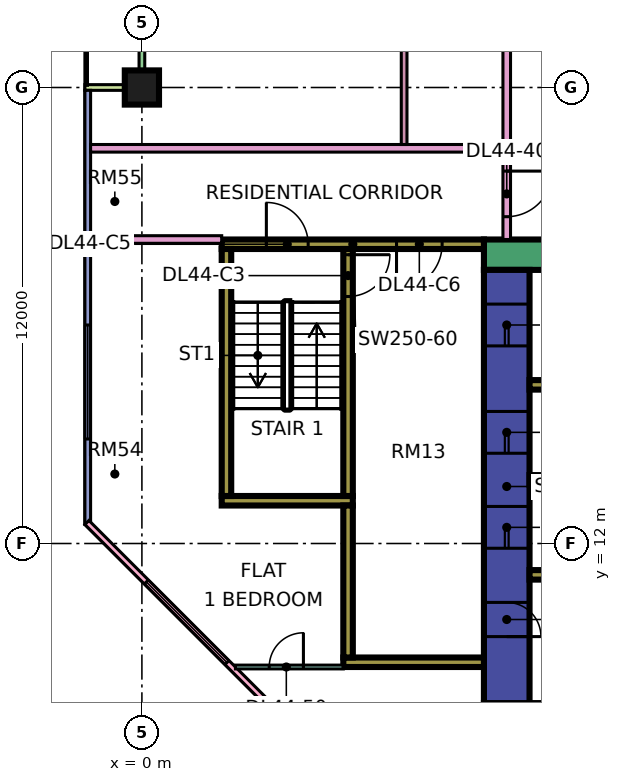
"""IFC4 building model, lengths in metres.
Left out: names, types, materials, properties, quantities, classifications, styles, units other than length and angle.
Written with IfcOpenShell. Run it as: python <this file> out.ifc"""

import sys

from ifc_helpers import new_model, si_unit, direction, frame, frame_2d, origin, origin_2d, place, context, subcontext, project, spatial, rectangle, extrude, element, fill, save


model = new_model("IFC4")
c1 = context("Model", 3, precision=1e-05, world=origin(), true_north=direction((0.0, 1.0)))
c2 = subcontext(c1, "Body", "Model", "MODEL_VIEW")
j1 = project(units=[si_unit("LENGTHUNIT", "METRE"), si_unit("PLANEANGLEUNIT", "RADIAN")], contexts=[c1])
p1 = place(None, origin())
s1 = spatial("IfcSite", under=j1, at=p1, CompositionType="ELEMENT")
p2 = place(p1, origin())
s2 = spatial("IfcBuilding", under=s1, at=p2, CompositionType="ELEMENT")
p3 = place(p2, frame((0.0, 0.0, 191.15)))
s3 = spatial("IfcBuildingStorey", under=s2, at=p3, CompositionType="ELEMENT", Elevation=191.15)
p4 = place(p3, frame((0.0, 24.0, 0.0), z_axis=(0.0, 0.0, 1.0), x_axis=(1.0, 0.0, 0.0)))
e1 = element("IfcColumn", 1, at=p4, inside=s3, PredefinedType="COLUMN", context=c2, shape_type="SweptSolid", body=[
    extrude(rectangle(XDim=0.9, YDim=0.9, at=origin_2d()), origin(), (0.0, 0.0, 1.0), 3.75),
])
p5 = place(p3, frame((9.0, 19.6, 0.0), z_axis=(0.0, 0.0, 1.0), x_axis=(1.0, 0.0, 0.0)))
e2 = element("IfcWall", 2, at=p5, inside=s3, PredefinedType="SHEAR", context=c2, shape_type="SweptSolid", body=[
    extrude(rectangle(XDim=25.0, YDim=0.8, at=frame_2d((12.5, 0.0))), origin(), (0.0, 0.0, 1.0), 3.75),
])
p6 = place(p5, frame((19.1, 0.0, 0.0)))
e3 = element("IfcOpeningElement", 3, at=p6, cuts=e2, PredefinedType="OPENING", context=c2, shape_type="SweptSolid", body=[
    extrude(rectangle(XDim=1.8, YDim=2.4, at=frame_2d((0.9, 1.2))), frame((0.0, 0.41, 0.0), z_axis=(0.0, -1.0, 0.0), x_axis=(1.0, 0.0, 0.0)), (0.0, 0.0, 1.0), 0.82),
])
p7 = place(p3, frame((9.6, 7.8, 0.0), z_axis=(0.0, 0.0, 1.0), x_axis=(0.0, 1.0, 0.0)))
e4 = element("IfcWall", 4, at=p7, inside=s3, PredefinedType="SHEAR", context=c2, shape_type="SweptSolid", body=[
    extrude(rectangle(XDim=11.4, YDim=1.2, at=frame_2d((5.7, 0.0))), origin(), (0.0, 0.0, 1.0), 3.75),
])
p8 = place(p7, frame((4.075, 0.0, 0.0)))
e5 = element("IfcOpeningElement", 5, at=p8, cuts=e4, PredefinedType="OPENING", context=c2, shape_type="SweptSolid", body=[
    extrude(rectangle(XDim=1.1, YDim=2.2, at=frame_2d((0.55, 1.1))), frame((0.0, 0.61, 0.0), z_axis=(0.0, -1.0, 0.0), x_axis=(1.0, 0.0, 0.0)), (0.0, 0.0, 1.0), 1.22),
])
p9 = place(p7, frame((6.575, 0.0, 0.0)))
e6 = element("IfcOpeningElement", 6, at=p9, cuts=e4, PredefinedType="OPENING", context=c2, shape_type="SweptSolid", body=[
    extrude(rectangle(XDim=1.1, YDim=2.2, at=frame_2d((0.55, 1.1))), frame((0.0, 0.61, 0.0), z_axis=(0.0, -1.0, 0.0), x_axis=(1.0, 0.0, 0.0)), (0.0, 0.0, 1.0), 1.22),
])
p10 = place(p7, frame((9.4, 0.0, 0.0)))
e7 = element("IfcOpeningElement", 7, at=p10, cuts=e4, PredefinedType="OPENING", context=c2, shape_type="SweptSolid", body=[
    extrude(rectangle(XDim=1.1, YDim=2.2, at=frame_2d((0.55, 1.1))), frame((0.0, 0.61, 0.0), z_axis=(0.0, -1.0, 0.0), x_axis=(1.0, 0.0, 0.0)), (0.0, 0.0, 1.0), 1.22),
])
p11 = place(p7, frame((1.75, 0.0, 0.0)))
e8 = element("IfcOpeningElement", 8, at=p11, cuts=e4, PredefinedType="OPENING", context=c2, shape_type="SweptSolid", body=[
    extrude(rectangle(XDim=0.9, YDim=2.1, at=frame_2d((0.45, 1.05))), frame((0.0, 0.61, 0.0), z_axis=(0.0, -1.0, 0.0), x_axis=(1.0, 0.0, 0.0)), (0.0, 0.0, 1.0), 1.22),
])
for number, where, z_axis, x_axis in (
    (9, (10.2, 11.175, 0.0), (0.0, 0.0, 1.0), (1.0, 0.0, 0.0)),
    (10, (10.2, 13.675, 0.0), (0.0, 0.0, 1.0), (1.0, 0.0, 0.0)),
    (11, (10.2, 16.175, 0.0), (0.0, 0.0, 1.0), (1.0, 0.0, 0.0)),
):
    element("IfcWall", number, at=place(p3, frame(where, z_axis=z_axis, x_axis=x_axis)), inside=s3, PredefinedType="SHEAR", context=c2, shape_type="SweptSolid", body=[
        extrude(rectangle(XDim=3.0, YDim=0.25, at=frame_2d((1.5, 0.0))), origin(), (0.0, 0.0, 1.0), 3.75),
    ])
p12 = place(p3, frame((2.1, 19.875, 0.0), z_axis=(0.0, 0.0, 1.0), x_axis=(1.0, 0.0, 0.0)))
e12 = element("IfcWall", 12, at=p12, inside=s3, PredefinedType="SHEAR", context=c2, shape_type="SweptSolid", body=[
    extrude(rectangle(XDim=6.9, YDim=0.25, at=frame_2d((3.45, 0.0))), origin(), (0.0, 0.0, 1.0), 3.75),
])
p13 = place(p12, frame((1.175, 0.0, 0.0)))
e13 = element("IfcOpeningElement", 13, at=p13, cuts=e12, PredefinedType="OPENING", context=c2, shape_type="SweptSolid", body=[
    extrude(rectangle(XDim=1.1, YDim=2.2, at=frame_2d((0.55, 1.1))), frame((0.0, 0.135, 0.0), z_axis=(0.0, -1.0, 0.0), x_axis=(1.0, 0.0, 0.0)), (0.0, 0.0, 1.0), 0.27),
])
p14 = place(p12, frame((4.6, 0.0, 0.0)))
e14 = element("IfcOpeningElement", 14, at=p14, cuts=e12, PredefinedType="OPENING", context=c2, shape_type="SweptSolid", body=[
    extrude(rectangle(XDim=1.2, YDim=2.2, at=frame_2d((0.6, 1.1))), frame((0.0, 0.135, 0.0), z_axis=(0.0, -1.0, 0.0), x_axis=(1.0, 0.0, 0.0)), (0.0, 0.0, 1.0), 0.27),
])
p15 = place(p3, frame((2.1, 13.125, 0.0), z_axis=(0.0, 0.0, 1.0), x_axis=(1.0, 0.0, 0.0)))
e15 = element("IfcWall", 15, at=p15, inside=s3, PredefinedType="SHEAR", context=c2, shape_type="SweptSolid", body=[
    extrude(rectangle(XDim=3.45, YDim=0.25, at=frame_2d((1.725, 0.0))), origin(), (0.0, 0.0, 1.0), 3.75),
])
p16 = place(p3, frame((2.225, 13.25, 0.0), z_axis=(0.0, 0.0, 1.0), x_axis=(0.0, 1.0, 0.0)))
e16 = element("IfcWall", 16, at=p16, inside=s3, PredefinedType="SHEAR", context=c2, shape_type="SweptSolid", body=[
    extrude(rectangle(XDim=6.5, YDim=0.25, at=frame_2d((3.25, 0.0))), origin(), (0.0, 0.0, 1.0), 3.75),
])
p17 = place(p3, frame((5.425, 13.25, 0.0), z_axis=(0.0, 0.0, 1.0), x_axis=(0.0, 1.0, 0.0)))
e17 = element("IfcWall", 17, at=p17, inside=s3, PredefinedType="SHEAR", context=c2, shape_type="SweptSolid", body=[
    extrude(rectangle(XDim=6.5, YDim=0.25, at=frame_2d((3.25, 0.0))), origin(), (0.0, 0.0, 1.0), 3.75),
])
p18 = place(p17, frame((5.25, 0.0, 0.0)))
e18 = element("IfcOpeningElement", 18, at=p18, cuts=e17, PredefinedType="OPENING", context=c2, shape_type="SweptSolid", body=[
    extrude(rectangle(XDim=1.1, YDim=2.2, at=frame_2d((0.55, 1.1))), frame((0.0, 0.135, 0.0), z_axis=(0.0, -1.0, 0.0), x_axis=(1.0, 0.0, 0.0)), (0.0, 0.0, 1.0), 0.27),
])
p19 = place(p3, frame((5.3, 8.875, 0.0), z_axis=(0.0, 0.0, 1.0), x_axis=(1.0, 0.0, 0.0)))
e19 = element("IfcWall", 19, at=p19, inside=s3, PredefinedType="SHEAR", context=c2, shape_type="SweptSolid", body=[
    extrude(rectangle(XDim=3.7, YDim=0.25, at=frame_2d((1.85, 0.0))), origin(), (0.0, 0.0, 1.0), 3.75),
])
p20 = place(p3, frame((5.425, 9.0, 0.0), z_axis=(0.0, 0.0, 1.0), x_axis=(0.0, 1.0, 0.0)))
e20 = element("IfcWall", 20, at=p20, inside=s3, PredefinedType="SHEAR", context=c2, shape_type="SweptSolid", body=[
    extrude(rectangle(XDim=4.0, YDim=0.25, at=frame_2d((2.0, 0.0))), origin(), (0.0, 0.0, 1.0), 3.75),
])
p21 = place(p3, frame((0.0, 35.925, 0.0), z_axis=(0.0, 0.0, 1.0), x_axis=(0.0, -1.0, 0.0)))
e21 = element("IfcWall", 21, at=p21, inside=s3, PredefinedType="SOLIDWALL", context=c2, shape_type="SweptSolid", body=[
    extrude(rectangle(XDim=11.85, YDim=0.15, at=frame_2d((5.925, 0.0))), origin(), (0.0, 0.0, 1.0), 3.35),
])
p22 = place(p21, frame((1.1, 0.0, 0.0)))
e22 = element("IfcOpeningElement", 22, at=p22, cuts=e21, PredefinedType="OPENING", context=c2, shape_type="SweptSolid", body=[
    extrude(rectangle(XDim=1.2, YDim=2.4, at=frame_2d((0.6, 1.2))), frame((0.0, 0.085, 0.0), z_axis=(0.0, -1.0, 0.0), x_axis=(1.0, 0.0, 0.0)), (0.0, 0.0, 1.0), 0.17),
])
p23 = place(p21, frame((3.525, 0.0, 0.45)))
e23 = element("IfcOpeningElement", 23, at=p23, cuts=e21, PredefinedType="OPENING", context=c2, shape_type="SweptSolid", body=[
    extrude(rectangle(XDim=1.8, YDim=2.4, at=frame_2d((0.9, 1.2))), frame((0.0, 0.085, 0.0), z_axis=(0.0, -1.0, 0.0), x_axis=(1.0, 0.0, 0.0)), (0.0, 0.0, 1.0), 0.17),
])
p24 = place(p21, frame((7.15, 0.0, 0.45)))
e24 = element("IfcOpeningElement", 24, at=p24, cuts=e21, PredefinedType="OPENING", context=c2, shape_type="SweptSolid", body=[
    extrude(rectangle(XDim=3.0, YDim=2.4, at=frame_2d((1.5, 1.2))), frame((0.0, 0.085, 0.0), z_axis=(0.0, -1.0, 0.0), x_axis=(1.0, 0.0, 0.0)), (0.0, 0.0, 1.0), 0.17),
])
p25 = place(p3, frame((-1.5, 24.0, 0.0), z_axis=(0.0, 0.0, 1.0), x_axis=(1.0, 0.0, 0.0)))
e25 = element("IfcWall", 25, at=p25, inside=s3, PredefinedType="SOLIDWALL", context=c2, shape_type="SweptSolid", body=[
    extrude(rectangle(XDim=1.5, YDim=0.15, at=frame_2d((0.75, 0.0))), origin(), (0.0, 0.0, 1.0), 3.35),
])
p26 = place(p3, frame((-1.425, 23.925, 0.0), z_axis=(0.0, 0.0, 1.0), x_axis=(0.0, -1.0, 0.0)))
e26 = element("IfcWall", 26, at=p26, inside=s3, PredefinedType="SOLIDWALL", context=c2, shape_type="SweptSolid", body=[
    extrude(rectangle(XDim=11.425, YDim=0.15, at=frame_2d((5.712, 0.0))), origin(), (0.0, 0.0, 1.0), 3.35),
])
p27 = place(p26, frame((6.175, 0.0, 0.45)))
e27 = element("IfcOpeningElement", 27, at=p27, cuts=e26, PredefinedType="OPENING", context=c2, shape_type="SweptSolid", body=[
    extrude(rectangle(XDim=3.0, YDim=2.4, at=frame_2d((1.5, 1.2))), frame((0.0, 0.085, 0.0), z_axis=(0.0, -1.0, 0.0), x_axis=(1.0, 0.0, 0.0)), (0.0, 0.0, 1.0), 0.17),
])
p28 = place(p3, frame((-1.447, 12.553, 0.0), z_axis=(0.0, 0.0, 1.0), x_axis=(0.707106781187, -0.707106781187, 0.0)))
e28 = element("IfcWall", 28, at=p28, inside=s3, PredefinedType="SOLIDWALL", context=c2, shape_type="SweptSolid", body=[
    extrude(rectangle(XDim=19.799, YDim=0.15, at=frame_2d((9.899, 0.0))), origin(), (0.0, 0.0, 1.0), 3.35),
])
p29 = place(p28, frame((2.212, 0.0, 0.45)))
e29 = element("IfcOpeningElement", 29, at=p29, cuts=e28, PredefinedType="OPENING", context=c2, shape_type="SweptSolid", body=[
    extrude(rectangle(XDim=3.0, YDim=2.4, at=frame_2d((1.5, 1.2))), frame((0.0, 0.085, 0.0), z_axis=(0.0, -1.0, 0.0), x_axis=(1.0, 0.0, 0.0)), (0.0, 0.0, 1.0), 0.17),
])
p30 = place(p28, frame((10.216, 0.0, 0.45)))
e30 = element("IfcOpeningElement", 30, at=p30, cuts=e28, PredefinedType="OPENING", context=c2, shape_type="SweptSolid", body=[
    extrude(rectangle(XDim=3.0, YDim=2.4, at=frame_2d((1.5, 1.2))), frame((0.0, 0.085, 0.0), z_axis=(0.0, -1.0, 0.0), x_axis=(1.0, 0.0, 0.0)), (0.0, 0.0, 1.0), 0.17),
])
p31 = place(p3, frame((-1.35, 20.0, 0.0), z_axis=(0.0, 0.0, 1.0), x_axis=(1.0, 0.0, 0.0)))
e31 = element("IfcWall", 31, at=p31, inside=s3, PredefinedType="PARTITIONING", context=c2, shape_type="SweptSolid", body=[
    extrude(rectangle(XDim=3.45, YDim=0.2, at=frame_2d((1.725, 0.0))), origin(), (0.0, 0.0, 1.0), 3.35),
])
p32 = place(p3, frame((-1.35, 22.4, 0.0), z_axis=(0.0, 0.0, 1.0), x_axis=(1.0, 0.0, 0.0)))
e32 = element("IfcWall", 32, at=p32, inside=s3, PredefinedType="PARTITIONING", context=c2, shape_type="SweptSolid", body=[
    extrude(rectangle(XDim=10.85, YDim=0.2, at=frame_2d((5.425, 0.0))), origin(), (0.0, 0.0, 1.0), 3.35),
])
p33 = place(p3, frame((2.461, 8.75, 0.0), z_axis=(0.0, 0.0, 1.0), x_axis=(1.0, 0.0, 0.0)))
e33 = element("IfcWall", 33, at=p33, inside=s3, PredefinedType="PARTITIONING", context=c2, shape_type="SweptSolid", body=[
    extrude(rectangle(XDim=2.839, YDim=0.1, at=frame_2d((1.419, 0.0))), origin(), (0.0, 0.0, 1.0), 3.35),
])
p34 = place(p33, frame((0.889, 0.0, 0.0)))
e34 = element("IfcOpeningElement", 34, at=p34, cuts=e33, PredefinedType="OPENING", context=c2, shape_type="SweptSolid", body=[
    extrude(rectangle(XDim=0.9, YDim=2.1, at=frame_2d((0.45, 1.05))), frame((0.0, 0.06, 0.0), z_axis=(0.0, -1.0, 0.0), x_axis=(1.0, 0.0, 0.0)), (0.0, 0.0, 1.0), 0.12),
])
p35 = place(p3, frame((6.9, 22.5, 0.0), z_axis=(0.0, 0.0, 1.0), x_axis=(0.0, 1.0, 0.0)))
e35 = element("IfcWall", 35, at=p35, inside=s3, PredefinedType="PARTITIONING", context=c2, shape_type="SweptSolid", body=[
    extrude(rectangle(XDim=9.975, YDim=0.15, at=frame_2d((4.988, 0.0))), origin(), (0.0, 0.0, 1.0), 3.35),
])
p36 = place(p35, frame((8.55, 0.0, 0.0)))
e36 = element("IfcOpeningElement", 36, at=p36, cuts=e35, PredefinedType="OPENING", context=c2, shape_type="SweptSolid", body=[
    extrude(rectangle(XDim=0.8, YDim=2.1, at=frame_2d((0.4, 1.05))), frame((0.0, 0.085, 0.0), z_axis=(0.0, -1.0, 0.0), x_axis=(1.0, 0.0, 0.0)), (0.0, 0.0, 1.0), 0.17),
])
p37 = place(p35, frame((3.5, 0.0, 0.0)))
e37 = element("IfcOpeningElement", 37, at=p37, cuts=e35, PredefinedType="OPENING", context=c2, shape_type="SweptSolid", body=[
    extrude(rectangle(XDim=0.9, YDim=2.1, at=frame_2d((0.45, 1.05))), frame((0.0, 0.085, 0.0), z_axis=(0.0, -1.0, 0.0), x_axis=(1.0, 0.0, 0.0)), (0.0, 0.0, 1.0), 0.17),
])
p38 = place(p3, frame((9.6, 20.0, 0.0), z_axis=(0.0, 0.0, 1.0), x_axis=(0.0, 1.0, 0.0)))
e38 = element("IfcWall", 38, at=p38, inside=s3, PredefinedType="PARTITIONING", context=c2, shape_type="SweptSolid", body=[
    extrude(rectangle(XDim=42.926, YDim=0.2, at=frame_2d((21.463, 0.0))), origin(), (0.0, 0.0, 1.0), 3.35),
])
p39 = place(p38, frame((31.65, 0.0, 0.0)))
e39 = element("IfcOpeningElement", 39, at=p39, cuts=e38, PredefinedType="OPENING", context=c2, shape_type="SweptSolid", body=[
    extrude(rectangle(XDim=1.0, YDim=2.1, at=frame_2d((0.5, 1.05))), frame((0.0, 0.11, 0.0), z_axis=(0.0, -1.0, 0.0), x_axis=(1.0, 0.0, 0.0)), (0.0, 0.0, 1.0), 0.22),
])
p40 = place(p38, frame((0.6, 0.0, 0.0)))
e40 = element("IfcOpeningElement", 40, at=p40, cuts=e38, PredefinedType="OPENING", context=c2, shape_type="SweptSolid", body=[
    extrude(rectangle(XDim=1.2, YDim=2.1, at=frame_2d((0.6, 1.05))), frame((0.0, 0.11, 0.0), z_axis=(0.0, -1.0, 0.0), x_axis=(1.0, 0.0, 0.0)), (0.0, 0.0, 1.0), 0.22),
])
p41 = place(p38, frame((13.65, 0.0, 0.0)))
e41 = element("IfcOpeningElement", 41, at=p41, cuts=e38, PredefinedType="OPENING", context=c2, shape_type="SweptSolid", body=[
    extrude(rectangle(XDim=1.0, YDim=2.1, at=frame_2d((0.5, 1.05))), frame((0.0, 0.11, 0.0), z_axis=(0.0, -1.0, 0.0), x_axis=(1.0, 0.0, 0.0)), (0.0, 0.0, 1.0), 0.22),
])
p42 = place(p27, origin())
e42 = element("IfcWindow", 42, at=p42, inside=s3, PartitioningType="SINGLE_PANEL", PredefinedType="WINDOW", context=c2, shape_type="SweptSolid", body=[
    extrude(rectangle(XDim=3.0, YDim=2.4, at=frame_2d((1.5, 1.2))), frame((0.0, 0.03, 0.0), z_axis=(0.0, -1.0, 0.0), x_axis=(1.0, 0.0, 0.0)), (0.0, 0.0, 1.0), 0.06),
])
fill(e27, e42)
p43 = place(p29, origin())
e43 = element("IfcWindow", 43, at=p43, inside=s3, PartitioningType="SINGLE_PANEL", PredefinedType="WINDOW", context=c2, shape_type="SweptSolid", body=[
    extrude(rectangle(XDim=3.0, YDim=2.4, at=frame_2d((1.5, 1.2))), frame((0.0, 0.03, 0.0), z_axis=(0.0, -1.0, 0.0), x_axis=(1.0, 0.0, 0.0)), (0.0, 0.0, 1.0), 0.06),
])
fill(e29, e43)
p44 = place(p8, origin())
e44 = element("IfcDoor", 44, at=p44, inside=s3, OperationType="DOUBLE_DOOR_SLIDING", PredefinedType="DOOR", context=c2, shape_type="SweptSolid", body=[
    extrude(rectangle(XDim=1.1, YDim=2.2, at=frame_2d((0.55, 1.1))), frame((0.0, 0.025, 0.0), z_axis=(0.0, -1.0, 0.0), x_axis=(1.0, 0.0, 0.0)), (0.0, 0.0, 1.0), 0.05),
])
fill(e5, e44)
p45 = place(p9, origin())
e45 = element("IfcDoor", 45, at=p45, inside=s3, OperationType="DOUBLE_DOOR_SLIDING", PredefinedType="DOOR", context=c2, shape_type="SweptSolid", body=[
    extrude(rectangle(XDim=1.1, YDim=2.2, at=frame_2d((0.55, 1.1))), frame((0.0, 0.025, 0.0), z_axis=(0.0, -1.0, 0.0), x_axis=(1.0, 0.0, 0.0)), (0.0, 0.0, 1.0), 0.05),
])
fill(e6, e45)
p46 = place(p10, origin())
e46 = element("IfcDoor", 46, at=p46, inside=s3, OperationType="DOUBLE_DOOR_SLIDING", PredefinedType="DOOR", context=c2, shape_type="SweptSolid", body=[
    extrude(rectangle(XDim=1.1, YDim=2.2, at=frame_2d((0.55, 1.1))), frame((0.0, 0.025, 0.0), z_axis=(0.0, -1.0, 0.0), x_axis=(1.0, 0.0, 0.0)), (0.0, 0.0, 1.0), 0.05),
])
fill(e7, e46)
p47 = place(p18, origin())
e47 = element("IfcDoor", 47, at=p47, inside=s3, OperationType="SINGLE_SWING_RIGHT", PredefinedType="DOOR", context=c2, shape_type="SweptSolid", body=[
    extrude(rectangle(XDim=1.1, YDim=2.2, at=frame_2d((0.55, 1.1))), frame((0.0, 0.025, 0.0), z_axis=(0.0, -1.0, 0.0), x_axis=(1.0, 0.0, 0.0)), (0.0, 0.0, 1.0), 0.05),
])
fill(e18, e47)
p48 = place(p11, frame((0.9, 0.0, 0.0), z_axis=(0.0, 0.0, 1.0), x_axis=(-1.0, 0.0, 0.0)))
e48 = element("IfcDoor", 48, at=p48, inside=s3, OperationType="SINGLE_SWING_LEFT", PredefinedType="DOOR", context=c2, shape_type="SweptSolid", body=[
    extrude(rectangle(XDim=0.9, YDim=2.1, at=frame_2d((0.45, 1.05))), frame((0.0, 0.025, 0.0), z_axis=(0.0, -1.0, 0.0), x_axis=(1.0, 0.0, 0.0)), (0.0, 0.0, 1.0), 0.05),
])
fill(e8, e48)
p49 = place(p13, origin())
e49 = element("IfcDoor", 49, at=p49, inside=s3, OperationType="SINGLE_SWING_LEFT", PredefinedType="DOOR", context=c2, shape_type="SweptSolid", body=[
    extrude(rectangle(XDim=1.1, YDim=2.2, at=frame_2d((0.55, 1.1))), frame((0.0, 0.025, 0.0), z_axis=(0.0, -1.0, 0.0), x_axis=(1.0, 0.0, 0.0)), (0.0, 0.0, 1.0), 0.05),
])
fill(e13, e49)
p50 = place(p14, frame((1.2, 0.0, 0.0), z_axis=(0.0, 0.0, 1.0), x_axis=(-1.0, 0.0, 0.0)))
e50 = element("IfcDoor", 50, at=p50, inside=s3, OperationType="SINGLE_SWING_LEFT", PredefinedType="DOOR", context=c2, shape_type="SweptSolid", body=[
    extrude(rectangle(XDim=1.2, YDim=2.2, at=frame_2d((0.6, 1.1))), frame((0.0, 0.025, 0.0), z_axis=(0.0, -1.0, 0.0), x_axis=(1.0, 0.0, 0.0)), (0.0, 0.0, 1.0), 0.05),
])
fill(e14, e50)
p51 = place(p40, origin())
e51 = element("IfcDoor", 51, at=p51, inside=s3, OperationType="SINGLE_SWING_RIGHT", PredefinedType="DOOR", context=c2, shape_type="SweptSolid", body=[
    extrude(rectangle(XDim=1.2, YDim=2.1, at=frame_2d((0.6, 1.05))), frame((0.0, 0.025, 0.0), z_axis=(0.0, -1.0, 0.0), x_axis=(1.0, 0.0, 0.0)), (0.0, 0.0, 1.0), 0.05),
])
fill(e40, e51)
p52 = place(p34, frame((0.9, 0.0, 0.0), z_axis=(0.0, 0.0, 1.0), x_axis=(-1.0, 0.0, 0.0)))
e52 = element("IfcDoor", 52, at=p52, inside=s3, OperationType="SINGLE_SWING_RIGHT", PredefinedType="DOOR", context=c2, shape_type="SweptSolid", body=[
    extrude(rectangle(XDim=0.9, YDim=2.1, at=frame_2d((0.45, 1.05))), frame((0.0, 0.025, 0.0), z_axis=(0.0, -1.0, 0.0), x_axis=(1.0, 0.0, 0.0)), (0.0, 0.0, 1.0), 0.05),
])
fill(e34, e52)
save(model, sys.argv[1])
